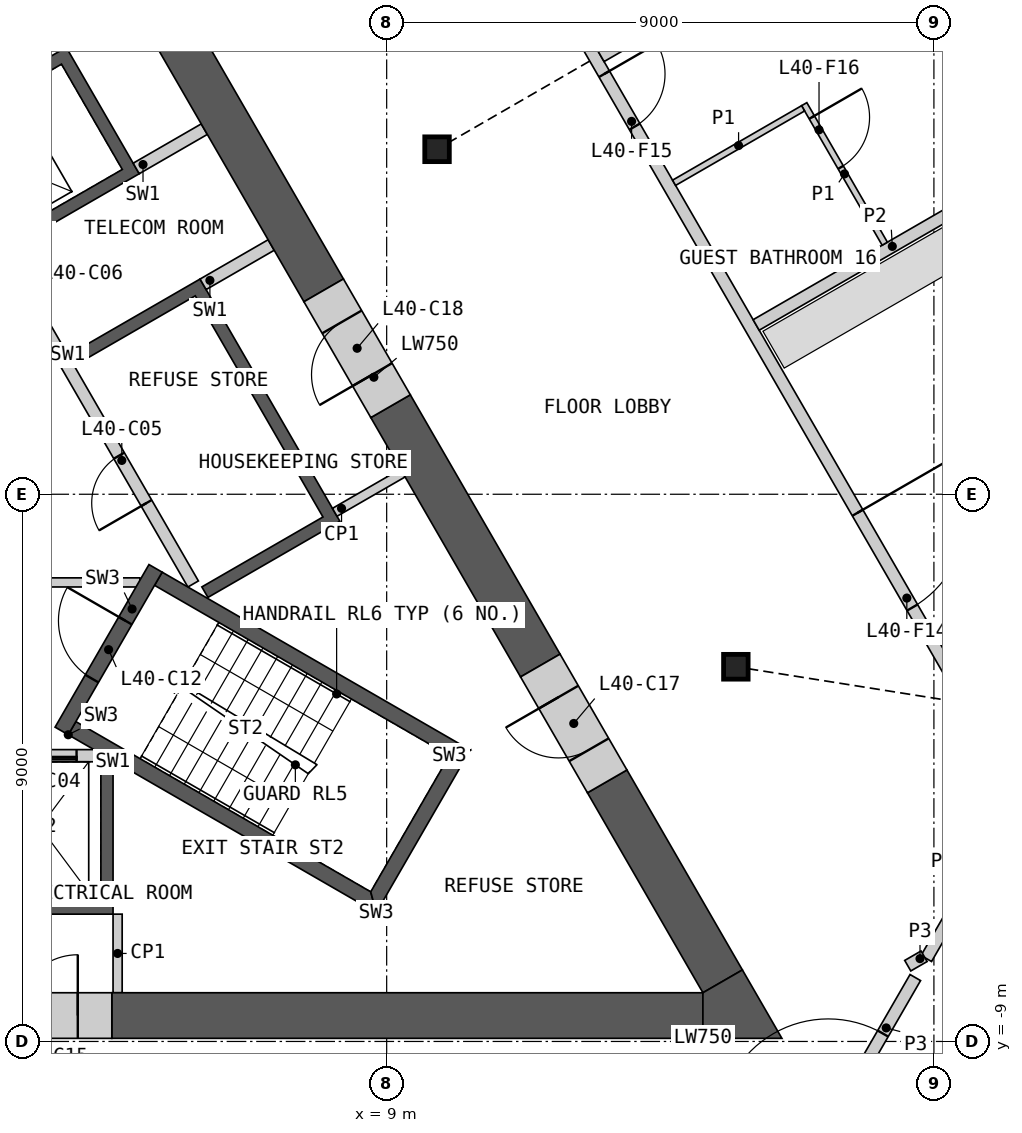
"""IFC4 building model, lengths in metres.
Left out: names, types, materials, properties, quantities, classifications, styles, units other than length and angle.
Written with IfcOpenShell. Run it as: python <this file> out.ifc"""

import sys

from ifc_helpers import new_model, si_unit, direction, frame, frame_2d, origin, origin_2d, place, context, subcontext, project, spatial, polyline, rectangle, i_section, outline, extrude, element, fill, save


model = new_model("IFC4")
c1 = context("Model", 3, precision=1e-05, world=origin(), true_north=direction((0.0, 1.0)))
c2 = subcontext(c1, "Body", "Model", "MODEL_VIEW")
j1 = project(units=[si_unit("LENGTHUNIT", "METRE"), si_unit("PLANEANGLEUNIT", "RADIAN")], contexts=[c1])
p1 = place(None, origin())
s1 = spatial("IfcSite", under=j1, at=p1, CompositionType="ELEMENT")
p2 = place(p1, origin())
s2 = spatial("IfcBuilding", under=s1, at=p2, CompositionType="ELEMENT")
p3 = place(p2, frame((0.0, 0.0, 187.2)))
s3 = spatial("IfcBuildingStorey", under=s2, at=p3, CompositionType="ELEMENT", Elevation=187.2)
for number, where, z_axis, x_axis in (
    (1, (14.743, -2.837, 0.0), (0.0, 0.0, 1.0), (1.0, 0.0, 0.0)),
    (2, (9.828, 5.675, 0.0), (0.0, 0.0, 1.0), (1.0, 0.0, 0.0)),
):
    element("IfcColumn", number, at=place(p3, frame(where, z_axis=z_axis, x_axis=x_axis)), inside=s3, PredefinedType="COLUMN", context=c2, shape_type="SweptSolid", body=[
        extrude(i_section(OverallWidth=0.404, OverallDepth=0.407, WebThickness=0.027, FlangeThickness=0.044, at=origin_2d()), origin(), (0.0, 0.0, 1.0), 3.6),
    ])
p4 = place(p3, origin())
e3 = element("IfcWall", 3, at=p4, inside=s3, PredefinedType="SHEAR", context=c2, shape_type="SweptSolid", body=[
    extrude(outline(polyline([(4.5, -4.4), (4.5, -6.906), (2.1, -6.906), (2.1, -4.4), (2.3, -4.4), (2.3, -6.7), (4.3, -6.7), (4.3, -4.4), (4.5, -4.4)])), origin(), (0.0, 0.0, 1.0), 3.25),
])
p5 = place(p3, frame((-4.187, -4.3, 0.0), z_axis=(0.0, 0.0, 1.0), x_axis=(1.0, 0.0, 0.0)))
e4 = element("IfcWall", 4, at=p5, inside=s3, PredefinedType="SOLIDWALL", context=c2, shape_type="SweptSolid", body=[
    extrude(rectangle(XDim=8.373, YDim=0.2, at=frame_2d((4.187, 0.0))), origin(), (0.0, 0.0, 1.0), 3.25),
])
p6 = place(p5, frame((0.287, 0.0, 0.0)))
e5 = element("IfcOpeningElement", 5, at=p6, cuts=e4, PredefinedType="OPENING", context=c2, shape_type="SweptSolid", body=[
    extrude(rectangle(XDim=1.2, YDim=2.1, at=frame_2d((0.6, 1.05))), frame((0.0, 0.11, 0.0), z_axis=(0.0, -1.0, 0.0), x_axis=(1.0, 0.0, 0.0)), (0.0, 0.0, 1.0), 0.22),
])
p7 = place(p5, frame((2.387, 0.0, 0.0)))
e6 = element("IfcOpeningElement", 6, at=p7, cuts=e4, PredefinedType="OPENING", context=c2, shape_type="SweptSolid", body=[
    extrude(rectangle(XDim=1.4, YDim=2.1, at=frame_2d((0.7, 1.05))), frame((0.0, 0.11, 0.0), z_axis=(0.0, -1.0, 0.0), x_axis=(1.0, 0.0, 0.0)), (0.0, 0.0, 1.0), 0.22),
])
p8 = place(p5, frame((4.837, 0.0, 0.0)))
e7 = element("IfcOpeningElement", 7, at=p8, cuts=e4, PredefinedType="OPENING", context=c2, shape_type="SweptSolid", body=[
    extrude(rectangle(XDim=0.9, YDim=2.1, at=frame_2d((0.45, 1.05))), frame((0.0, 0.11, 0.0), z_axis=(0.0, -1.0, 0.0), x_axis=(1.0, 0.0, 0.0)), (0.0, 0.0, 1.0), 0.22),
])
p9 = place(p5, frame((6.887, 0.0, 0.0)))
e8 = element("IfcOpeningElement", 8, at=p9, cuts=e4, PredefinedType="OPENING", context=c2, shape_type="SweptSolid", body=[
    extrude(rectangle(XDim=1.2, YDim=2.1, at=frame_2d((0.6, 1.05))), frame((0.0, 0.11, 0.0), z_axis=(0.0, -1.0, 0.0), x_axis=(1.0, 0.0, 0.0)), (0.0, 0.0, 1.0), 0.22),
])
p10 = place(p3, origin())
e9 = element("IfcWall", 9, at=p10, inside=s3, PredefinedType="SHEAR", context=c2, shape_type="SweptSolid", body=[
    extrude(outline(polyline([(1.561, 6.097), (3.731, 7.35), (4.931, 5.272), (2.76, 4.019), (2.66, 4.192), (4.652, 5.342), (3.652, 7.074), (1.66, 5.924), (1.561, 6.097)])), origin(), (0.0, 0.0, 1.0), 3.25),
])
p11 = place(p3, origin())
e10 = element("IfcWall", 10, at=p11, inside=s3, PredefinedType="SHEAR", context=c2, shape_type="SweptSolid", body=[
    extrude(outline(polyline([(3.76, 2.287), (5.931, 3.54), (8.231, -0.444), (6.061, -1.697), (5.96, -1.524), (7.952, -0.374), (5.852, 3.263), (3.861, 2.113), (3.76, 2.287)])), origin(), (0.0, 0.0, 1.0), 3.25),
])
p12 = place(p3, frame((5.817, -1.476, 0.0), z_axis=(0.0, 0.0, 1.0), x_axis=(-0.500002616675, 0.866023893041, 0.0)))
e11 = element("IfcWall", 11, at=p12, inside=s3, PredefinedType="SOLIDWALL", context=c2, shape_type="SweptSolid", body=[
    extrude(rectangle(XDim=8.373, YDim=0.2, at=frame_2d((4.187, 0.0))), origin(), (0.0, 0.0, 1.0), 3.25),
])
p13 = place(p12, frame((1.537, 0.0, 0.0)))
e12 = element("IfcOpeningElement", 12, at=p13, cuts=e11, PredefinedType="OPENING", context=c2, shape_type="SweptSolid", body=[
    extrude(rectangle(XDim=0.9, YDim=2.1, at=frame_2d((0.45, 1.05))), frame((0.0, 0.11, 0.0), z_axis=(0.0, -1.0, 0.0), x_axis=(1.0, 0.0, 0.0)), (0.0, 0.0, 1.0), 0.22),
])
p14 = place(p12, frame((4.837, 0.0, 0.0)))
e13 = element("IfcOpeningElement", 13, at=p14, cuts=e11, PredefinedType="OPENING", context=c2, shape_type="SweptSolid", body=[
    extrude(rectangle(XDim=0.9, YDim=2.1, at=frame_2d((0.45, 1.05))), frame((0.0, 0.11, 0.0), z_axis=(0.0, -1.0, 0.0), x_axis=(1.0, 0.0, 0.0)), (0.0, 0.0, 1.0), 0.22),
])
p15 = place(p12, frame((6.937, 0.0, 0.0)))
e14 = element("IfcOpeningElement", 14, at=p15, cuts=e11, PredefinedType="OPENING", context=c2, shape_type="SweptSolid", body=[
    extrude(rectangle(XDim=1.1, YDim=2.1, at=frame_2d((0.55, 1.05))), frame((0.0, 0.11, 0.0), z_axis=(0.0, -1.0, 0.0), x_axis=(1.0, 0.0, 0.0)), (0.0, 0.0, 1.0), 0.22),
])
p16 = place(p3, frame((5.981, 3.453, 0.0), z_axis=(0.0, 0.0, 1.0), x_axis=(0.865968639725, 0.500098305348, 0.0)))
e15 = element("IfcWall", 15, at=p16, inside=s3, PredefinedType="SHEAR", context=c2, shape_type="SweptSolid", body=[
    extrude(rectangle(XDim=1.293, YDim=0.2, at=frame_2d((0.646, 0.0))), origin(), (0.0, 0.0, 1.0), 3.25),
])
p17 = place(p3, frame((4.881, 5.358, 0.0), z_axis=(0.0, 0.0, 1.0), x_axis=(0.866084958089, 0.499896834728, 0.0)))
e16 = element("IfcWall", 16, at=p17, inside=s3, PredefinedType="SHEAR", context=c2, shape_type="SweptSolid", body=[
    extrude(rectangle(XDim=1.293, YDim=0.2, at=frame_2d((0.646, 0.0))), origin(), (0.0, 0.0, 1.0), 3.25),
])
p18 = place(p3, frame((-4.941, -1.45, 0.0), z_axis=(0.0, 0.0, 1.0), x_axis=(1.0, 0.0, 0.0)))
e17 = element("IfcWall", 17, at=p18, inside=s3, PredefinedType="PARTITIONING", context=c2, shape_type="SweptSolid", body=[
    extrude(rectangle(XDim=9.882, YDim=0.15, at=frame_2d((4.941, 0.0))), origin(), (0.0, 0.0, 1.0), 3.25),
])
p19 = place(p18, frame((4.391, 0.0, 0.0)))
e18 = element("IfcOpeningElement", 18, at=p19, cuts=e17, PredefinedType="OPENING", context=c2, shape_type="SweptSolid", body=[
    extrude(rectangle(XDim=1.1, YDim=2.1, at=frame_2d((0.55, 1.05))), frame((0.0, 0.085, 0.0), z_axis=(0.0, -1.0, 0.0), x_axis=(1.0, 0.0, 0.0)), (0.0, 0.0, 1.0), 0.17),
])
p20 = place(p3, origin())
e19 = element("IfcWall", 19, at=p20, inside=s3, PredefinedType="SHEAR", context=c2, shape_type="SweptSolid", body=[
    extrude(outline(polyline([(3.763, -3.956), (8.83, -6.881), (8.738, -6.539), (3.888, -3.739), (3.763, -3.956)])), origin(), (0.0, 0.0, 1.0), 3.25),
])
p21 = place(p3, origin())
e20 = element("IfcWall", 20, at=p21, inside=s3, PredefinedType="SHEAR", context=c2, shape_type="SweptSolid", body=[
    extrude(outline(polyline([(8.83, -6.881), (10.374, -4.206), (10.032, -4.298), (8.738, -6.539), (8.83, -6.881)])), origin(), (0.0, 0.0, 1.0), 3.25),
])
p22 = place(p3, origin())
e21 = element("IfcWall", 21, at=p22, inside=s3, PredefinedType="SHEAR", context=c2, shape_type="SweptSolid", body=[
    extrude(outline(polyline([(10.032, -4.298), (10.374, -4.206), (5.307, -1.281), (5.182, -1.498), (10.032, -4.298)])), origin(), (0.0, 0.0, 1.0), 3.25),
])
p23 = place(p3, frame((3.655, -3.893, 0.0), z_axis=(0.0, 0.0, 1.0), x_axis=(0.499982516597, 0.866035497597, 0.0)))
e22 = element("IfcWall", 22, at=p23, inside=s3, PredefinedType="SHEAR", context=c2, shape_type="SweptSolid", body=[
    extrude(rectangle(XDim=3.088, YDim=0.25, at=frame_2d((1.544, 0.0))), origin(), (0.0, 0.0, 1.0), 3.25),
])
p24 = place(p23, frame((0.994, 0.0, 0.0)))
e23 = element("IfcOpeningElement", 23, at=p24, cuts=e22, PredefinedType="OPENING", context=c2, shape_type="SweptSolid", body=[
    extrude(rectangle(XDim=1.1, YDim=2.1, at=frame_2d((0.55, 1.05))), frame((0.0, 0.135, 0.0), z_axis=(0.0, -1.0, 0.0), x_axis=(1.0, 0.0, 0.0)), (0.0, 0.0, 1.0), 0.27),
])
for number, where, z_axis, x_axis in (
    (24, (4.575, -6.906, 0.0), (0.0, 0.0, 1.0), (0.0, -1.0, 0.0)),
    (25, (9.266, 0.349, 0.0), (0.0, 0.0, 1.0), (-0.866, -0.5, 0.0)),
):
    element("IfcWall", number, at=place(p3, frame(where, z_axis=z_axis, x_axis=x_axis)), inside=s3, PredefinedType="PARTITIONING", context=c2, shape_type="SweptSolid", body=[
        extrude(rectangle(XDim=1.293, YDim=0.15, at=frame_2d((0.646, 0.0))), origin(), (0.0, 0.0, 1.0), 3.25),
    ])
p25 = place(p3, frame((4.48, -8.574, 0.0), z_axis=(0.0, 0.0, 1.0), x_axis=(1.0, 0.0, 0.0)))
e26 = element("IfcWall", 26, at=p25, inside=s3, PredefinedType="SHEAR", context=c2, shape_type="SweptSolid", body=[
    extrude(rectangle(XDim=9.721, YDim=0.75, at=frame_2d((4.86, 0.0))), origin(), (0.0, 0.0, 1.0), 3.25),
])
p26 = place(p3, frame((7.964, 3.354, 0.0), z_axis=(0.0, 0.0, 1.0), x_axis=(-0.50002928721, 0.866008494146, 0.0)))
e27 = element("IfcWall", 27, at=p26, inside=s3, PredefinedType="SHEAR", context=c2, shape_type="SweptSolid", body=[
    extrude(rectangle(XDim=6.405, YDim=0.75, at=frame_2d((3.203, 0.0))), origin(), (0.0, 0.0, 1.0), 3.25),
])
p27 = place(p3, frame((11.527, -2.817, 0.0), z_axis=(0.0, 0.0, 1.0), x_axis=(-0.50001992892, 0.866013897511, 0.0)))
e28 = element("IfcWall", 28, at=p27, inside=s3, PredefinedType="SHEAR", context=c2, shape_type="SweptSolid", body=[
    extrude(rectangle(XDim=4.926, YDim=0.75, at=frame_2d((2.463, 0.0))), origin(), (0.0, 0.0, 1.0), 3.25),
])
p28 = place(p3, frame((14.526, -8.011, 0.0), z_axis=(0.0, 0.0, 1.0), x_axis=(-0.499996970966, 0.866027152591, 0.0)))
e29 = element("IfcWall", 29, at=p28, inside=s3, PredefinedType="SHEAR", context=c2, shape_type="SweptSolid", body=[
    extrude(rectangle(XDim=3.798, YDim=0.75, at=frame_2d((1.899, 0.0))), origin(), (0.0, 0.0, 1.0), 3.25),
])
p29 = place(p3, origin())
e30 = element("IfcWall", 30, at=p29, inside=s3, PredefinedType="SHEAR", context=c2, shape_type="SweptSolid", body=[
    extrude(outline(polyline([(14.201, -8.949), (14.201, -8.199), (14.851, -7.824), (15.5, -8.949), (14.201, -8.949)])), origin(), (0.0, 0.0, 1.0), 3.25),
])
p30 = place(p3, frame((2.32, -8.574, 0.0), z_axis=(0.0, 0.0, 1.0), x_axis=(1.0, 0.0, 0.0)))
e31 = element("IfcWall", 31, at=p30, inside=s3, PredefinedType="SHEAR", context=c2, shape_type="SweptSolid", body=[
    extrude(rectangle(XDim=2.16, YDim=0.75, at=frame_2d((1.08, 0.0))), origin(), (0.0, 0.0, 1.0), 3.25),
])
p31 = place(p30, frame((0.6, 0.0, 0.0)))
e32 = element("IfcOpeningElement", 32, at=p31, cuts=e31, PredefinedType="OPENING", context=c2, shape_type="SweptSolid", body=[
    extrude(rectangle(XDim=1.0, YDim=2.1, at=frame_2d((0.5, 1.05))), frame((0.0, 0.385, 0.0), z_axis=(0.0, -1.0, 0.0), x_axis=(1.0, 0.0, 0.0)), (0.0, 0.0, 1.0), 0.77),
])
p32 = place(p3, frame((12.627, -4.722, 0.0), z_axis=(0.0, 0.0, 1.0), x_axis=(-0.499946605688, 0.86605622881, 0.0)))
e33 = element("IfcWall", 33, at=p32, inside=s3, PredefinedType="SHEAR", context=c2, shape_type="SweptSolid", body=[
    extrude(rectangle(XDim=2.2, YDim=0.75, at=frame_2d((1.1, 0.0))), origin(), (0.0, 0.0, 1.0), 3.25),
])
p33 = place(p32, frame((0.6, 0.0, 0.0)))
e34 = element("IfcOpeningElement", 34, at=p33, cuts=e33, PredefinedType="OPENING", context=c2, shape_type="SweptSolid", body=[
    extrude(rectangle(XDim=1.0, YDim=2.1, at=frame_2d((0.5, 1.05))), frame((0.0, 0.385, 0.0), z_axis=(0.0, -1.0, 0.0), x_axis=(1.0, 0.0, 0.0)), (0.0, 0.0, 1.0), 0.77),
])
p34 = place(p3, frame((9.064, 1.448, 0.0), z_axis=(0.0, 0.0, 1.0), x_axis=(-0.50002983664, 0.866008176907, 0.0)))
e35 = element("IfcWall", 35, at=p34, inside=s3, PredefinedType="SHEAR", context=c2, shape_type="SweptSolid", body=[
    extrude(rectangle(XDim=2.2, YDim=0.75, at=frame_2d((1.1, 0.0))), origin(), (0.0, 0.0, 1.0), 3.25),
])
p35 = place(p34, frame((0.6, 0.0, 0.0)))
e36 = element("IfcOpeningElement", 36, at=p35, cuts=e35, PredefinedType="OPENING", context=c2, shape_type="SweptSolid", body=[
    extrude(rectangle(XDim=1.0, YDim=2.1, at=frame_2d((0.5, 1.05))), frame((0.0, 0.385, 0.0), z_axis=(0.0, -1.0, 0.0), x_axis=(1.0, 0.0, 0.0)), (0.0, 0.0, 1.0), 0.77),
])
p36 = place(p3, frame((5.377, 19.385, 0.0), z_axis=(0.0, 0.0, 1.0), x_axis=(0.500000757641, -0.86602496636, 0.0)))
e37 = element("IfcWall", 37, at=p36, inside=s3, PredefinedType="PARTITIONING", context=c2, shape_type="SweptSolid", body=[
    extrude(rectangle(XDim=28.198, YDim=0.2, at=frame_2d((14.099, 0.0))), origin(), (0.0, 0.0, 1.0), 3.25),
])
p37 = place(p36, frame((22.735, 0.0, 0.0)))
e38 = element("IfcOpeningElement", 38, at=p37, cuts=e37, PredefinedType="OPENING", context=c2, shape_type="SweptSolid", body=[
    extrude(rectangle(XDim=1.8, YDim=2.1, at=frame_2d((0.9, 1.05))), frame((0.0, 0.11, 0.0), z_axis=(0.0, -1.0, 0.0), x_axis=(1.0, 0.0, 0.0)), (0.0, 0.0, 1.0), 0.22),
])
p38 = place(p36, frame((14.402, 0.0, 0.0)))
e39 = element("IfcOpeningElement", 39, at=p38, cuts=e37, PredefinedType="OPENING", context=c2, shape_type="SweptSolid", body=[
    extrude(rectangle(XDim=1.0, YDim=2.1, at=frame_2d((0.5, 1.05))), frame((0.0, 0.11, 0.0), z_axis=(0.0, -1.0, 0.0), x_axis=(1.0, 0.0, 0.0)), (0.0, 0.0, 1.0), 0.22),
])
p39 = place(p36, frame((12.796, 0.0, 0.0)))
e40 = element("IfcOpeningElement", 40, at=p39, cuts=e37, PredefinedType="OPENING", context=c2, shape_type="SweptSolid", body=[
    extrude(rectangle(XDim=1.0, YDim=2.1, at=frame_2d((0.5, 1.05))), frame((0.0, 0.11, 0.0), z_axis=(0.0, -1.0, 0.0), x_axis=(1.0, 0.0, 0.0)), (0.0, 0.0, 1.0), 0.22),
])
p40 = place(p36, frame((4.164, 0.0, 0.0)))
e41 = element("IfcOpeningElement", 41, at=p40, cuts=e37, PredefinedType="OPENING", context=c2, shape_type="SweptSolid", body=[
    extrude(rectangle(XDim=1.0, YDim=2.1, at=frame_2d((0.5, 1.05))), frame((0.0, 0.11, 0.0), z_axis=(0.0, -1.0, 0.0), x_axis=(1.0, 0.0, 0.0)), (0.0, 0.0, 1.0), 0.22),
])
p41 = place(p36, frame((1.452, 0.0, 0.0)))
e42 = element("IfcOpeningElement", 42, at=p41, cuts=e37, PredefinedType="OPENING", context=c2, shape_type="SweptSolid", body=[
    extrude(rectangle(XDim=0.95, YDim=2.1, at=frame_2d((0.475, 1.05))), frame((0.0, 0.11, 0.0), z_axis=(0.0, -1.0, 0.0), x_axis=(1.0, 0.0, 0.0)), (0.0, 0.0, 1.0), 0.22),
])
p42 = place(p3, frame((12.513, 7.225, 0.0), z_axis=(0.0, 0.0, 1.0), x_axis=(0.866032905446, 0.499987006516, 0.0)))
e43 = element("IfcWall", 43, at=p42, inside=s3, PredefinedType="PARTITIONING", context=c2, shape_type="SweptSolid", body=[
    extrude(rectangle(XDim=9.799, YDim=0.25, at=frame_2d((4.899, 0.0))), origin(), (0.0, 0.0, 1.0), 2.404),
])
p43 = place(p3, frame((15.781, -11.262, 0.0), z_axis=(0.0, 0.0, 1.0), x_axis=(0.499989446428, 0.866031496806, 0.0)))
e44 = element("IfcWall", 44, at=p43, inside=s3, PredefinedType="PARTITIONING", context=c2, shape_type="SweptSolid", body=[
    extrude(rectangle(XDim=3.826, YDim=0.2, at=frame_2d((1.913, 0.0))), origin(), (0.0, 0.0, 1.0), 3.25),
])
p44 = place(p43, frame((0.962, 0.0, 0.0)))
e45 = element("IfcOpeningElement", 45, at=p44, cuts=e44, PredefinedType="OPENING", context=c2, shape_type="SweptSolid", body=[
    extrude(rectangle(XDim=1.8, YDim=2.1, at=frame_2d((0.9, 1.05))), frame((0.0, 0.11, 0.0), z_axis=(0.0, -1.0, 0.0), x_axis=(1.0, 0.0, 0.0)), (0.0, 0.0, 1.0), 0.22),
])
p45 = place(p3, frame((17.875, -7.635, 0.0), z_axis=(0.0, 0.0, 1.0), x_axis=(0.499952404951, 0.866052881055, 0.0)))
e46 = element("IfcWall", 46, at=p45, inside=s3, PredefinedType="PARTITIONING", context=c2, shape_type="SweptSolid", body=[
    extrude(rectangle(XDim=3.002, YDim=0.2, at=frame_2d((1.501, 0.0))), origin(), (0.0, 0.0, 1.0), 3.25),
])
p46 = place(p3, frame((17.57, -7.754, 0.0), z_axis=(0.0, 0.0, 1.0), x_axis=(0.866054481515, 0.499949632511, 0.0)))
e47 = element("IfcWall", 47, at=p46, inside=s3, PredefinedType="PARTITIONING", context=c2, shape_type="SweptSolid", body=[
    extrude(rectangle(XDim=0.31, YDim=0.2, at=frame_2d((0.155, 0.0))), origin(), (0.0, 0.0, 1.0), 3.25),
])
p47 = place(p3, frame((15.077, 2.784, 0.0), z_axis=(0.0, 0.0, 1.0), x_axis=(0.866020469142, 0.500008546953, 0.0)))
e48 = element("IfcWall", 48, at=p47, inside=s3, PredefinedType="PARTITIONING", context=c2, shape_type="SweptSolid", body=[
    extrude(rectangle(XDim=5.171, YDim=0.2, at=frame_2d((2.585, 0.0))), origin(), (0.0, 0.0, 1.0), 2.404),
])
p48 = place(p3, frame((15.867, 6.416, 0.0), z_axis=(0.0, 0.0, 1.0), x_axis=(0.500062700197, -0.865989200783, 0.0)))
e49 = element("IfcWall", 49, at=p48, inside=s3, PredefinedType="PARTITIONING", context=c2, shape_type="SweptSolid", body=[
    extrude(rectangle(XDim=2.65, YDim=0.1, at=frame_2d((1.325, 0.0))), origin(), (0.0, 0.0, 1.0), 2.404),
])
p49 = place(p48, frame((0.25, 0.0, 0.0)))
e50 = element("IfcOpeningElement", 50, at=p49, cuts=e49, PredefinedType="OPENING", context=c2, shape_type="SweptSolid", body=[
    extrude(rectangle(XDim=0.95, YDim=2.1, at=frame_2d((0.475, 1.05))), frame((0.0, 0.06, 0.0), z_axis=(0.0, -1.0, 0.0), x_axis=(1.0, 0.0, 0.0)), (0.0, 0.0, 1.0), 0.12),
])
p50 = place(p3, frame((13.727, 5.123, 0.0), z_axis=(0.0, 0.0, 1.0), x_axis=(0.866032905446, 0.499987006516, 0.0)))
e51 = element("IfcWall", 51, at=p50, inside=s3, PredefinedType="PARTITIONING", context=c2, shape_type="SweptSolid", body=[
    extrude(rectangle(XDim=2.45, YDim=0.1, at=frame_2d((1.225, 0.0))), origin(), (0.0, 0.0, 1.0), 2.404),
])
p51 = place(p9, origin())
e52 = element("IfcDoor", 52, at=p51, inside=s3, OperationType="SLIDING_TO_LEFT", PredefinedType="DOOR", context=c2, shape_type="SweptSolid", body=[
    extrude(rectangle(XDim=1.2, YDim=2.1, at=frame_2d((0.6, 1.05))), frame((0.0, 0.025, 0.0), z_axis=(0.0, -1.0, 0.0), x_axis=(1.0, 0.0, 0.0)), (0.0, 0.0, 1.0), 0.05),
])
fill(e8, e52)
p52 = place(p13, origin())
e53 = element("IfcDoor", 53, at=p52, inside=s3, OperationType="SINGLE_SWING_LEFT", PredefinedType="DOOR", context=c2, shape_type="SweptSolid", body=[
    extrude(rectangle(XDim=0.9, YDim=2.1, at=frame_2d((0.45, 1.05))), frame((0.0, 0.025, 0.0), z_axis=(0.0, -1.0, 0.0), x_axis=(1.0, 0.0, 0.0)), (0.0, 0.0, 1.0), 0.05),
])
fill(e12, e53)
p53 = place(p24, origin())
e54 = element("IfcDoor", 54, at=p53, inside=s3, OperationType="SINGLE_SWING_RIGHT", PredefinedType="DOOR", context=c2, shape_type="SweptSolid", body=[
    extrude(rectangle(XDim=1.1, YDim=2.1, at=frame_2d((0.55, 1.05))), frame((0.0, 0.025, 0.0), z_axis=(0.0, -1.0, 0.0), x_axis=(1.0, 0.0, 0.0)), (0.0, 0.0, 1.0), 0.05),
])
fill(e23, e54)
p54 = place(p31, origin())
e55 = element("IfcDoor", 55, at=p54, inside=s3, OperationType="SINGLE_SWING_RIGHT", PredefinedType="DOOR", context=c2, shape_type="SweptSolid", body=[
    extrude(rectangle(XDim=1.0, YDim=2.1, at=frame_2d((0.5, 1.05))), frame((0.0, 0.13, 0.0), z_axis=(0.0, -1.0, 0.0), x_axis=(1.0, 0.0, 0.0)), (0.0, 0.0, 1.0), 0.05),
])
fill(e32, e55)
p55 = place(p33, origin())
e56 = element("IfcDoor", 56, at=p55, inside=s3, OperationType="SINGLE_SWING_RIGHT", PredefinedType="DOOR", context=c2, shape_type="SweptSolid", body=[
    extrude(rectangle(XDim=1.0, YDim=2.1, at=frame_2d((0.5, 1.05))), frame((0.0, 0.13, 0.0), z_axis=(0.0, -1.0, 0.0), x_axis=(1.0, 0.0, 0.0)), (0.0, 0.0, 1.0), 0.05),
])
fill(e34, e56)
p56 = place(p35, origin())
e57 = element("IfcDoor", 57, at=p56, inside=s3, OperationType="SINGLE_SWING_LEFT", PredefinedType="DOOR", context=c2, shape_type="SweptSolid", body=[
    extrude(rectangle(XDim=1.0, YDim=2.1, at=frame_2d((0.5, 1.05))), frame((0.0, 0.13, 0.0), z_axis=(0.0, -1.0, 0.0), x_axis=(1.0, 0.0, 0.0)), (0.0, 0.0, 1.0), 0.05),
])
fill(e36, e57)
p57 = place(p44, origin())
e58 = element("IfcDoor", 58, at=p57, inside=s3, OperationType="DOUBLE_DOOR_SINGLE_SWING", PredefinedType="DOOR", context=c2, shape_type="SweptSolid", body=[
    extrude(rectangle(XDim=1.8, YDim=2.1, at=frame_2d((0.9, 1.05))), frame((0.0, 0.025, 0.0), z_axis=(0.0, -1.0, 0.0), x_axis=(1.0, 0.0, 0.0)), (0.0, 0.0, 1.0), 0.05),
])
fill(e45, e58)
p58 = place(p37, origin())
e59 = element("IfcDoor", 59, at=p58, inside=s3, OperationType="DOUBLE_DOOR_SINGLE_SWING", PredefinedType="DOOR", context=c2, shape_type="SweptSolid", body=[
    extrude(rectangle(XDim=1.8, YDim=2.1, at=frame_2d((0.9, 1.05))), frame((0.0, 0.025, 0.0), z_axis=(0.0, -1.0, 0.0), x_axis=(1.0, 0.0, 0.0)), (0.0, 0.0, 1.0), 0.05),
])
fill(e38, e59)
p59 = place(p38, origin())
e60 = element("IfcDoor", 60, at=p59, inside=s3, OperationType="SINGLE_SWING_LEFT", PredefinedType="DOOR", context=c2, shape_type="SweptSolid", body=[
    extrude(rectangle(XDim=1.0, YDim=2.1, at=frame_2d((0.5, 1.05))), frame((0.0, 0.025, 0.0), z_axis=(0.0, -1.0, 0.0), x_axis=(1.0, 0.0, 0.0)), (0.0, 0.0, 1.0), 0.05),
])
fill(e39, e60)
p60 = place(p49, origin())
e61 = element("IfcDoor", 61, at=p60, inside=s3, OperationType="SINGLE_SWING_LEFT", PredefinedType="DOOR", context=c2, shape_type="SweptSolid", body=[
    extrude(rectangle(XDim=0.95, YDim=2.1, at=frame_2d((0.475, 1.05))), frame((0.0, 0.025, 0.0), z_axis=(0.0, -1.0, 0.0), x_axis=(1.0, 0.0, 0.0)), (0.0, 0.0, 1.0), 0.05),
])
fill(e50, e61)
save(model, sys.argv[1])
